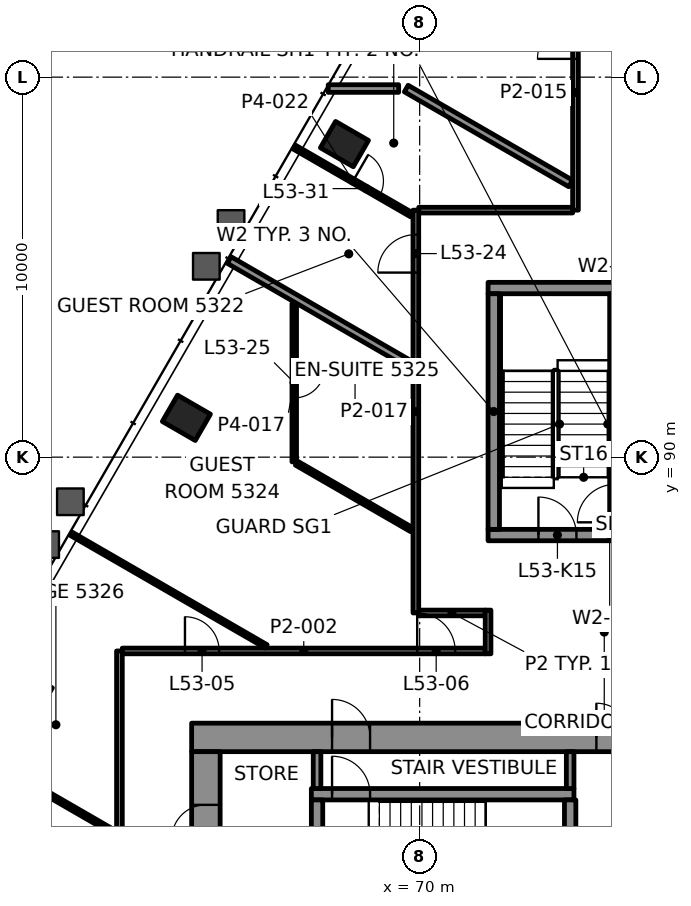
"""IFC4 building model, lengths in metres.
Left out: names, types, materials, properties, quantities, classifications, styles, units other than length and angle.
Written with IfcOpenShell. Run it as: python <this file> out.ifc"""

import sys

from ifc_helpers import new_model, si_unit, direction, frame, frame_2d, origin, origin_2d, place, context, subcontext, project, spatial, rectangle, hollow_rectangle, extrude, element, fill, save


model = new_model("IFC4")
c1 = context("Model", 3, precision=1e-05, world=origin(), true_north=direction((0.0, 1.0)))
c2 = subcontext(c1, "Body", "Model", "MODEL_VIEW")
j1 = project(units=[si_unit("LENGTHUNIT", "METRE"), si_unit("PLANEANGLEUNIT", "RADIAN")], contexts=[c1])
p1 = place(None, origin())
s1 = spatial("IfcSite", under=j1, at=p1, CompositionType="ELEMENT")
p2 = place(p1, origin())
s2 = spatial("IfcBuilding", under=s1, at=p2, CompositionType="ELEMENT")
p3 = place(p2, frame((0.0, 0.0, 226.0)))
s3 = spatial("IfcBuildingStorey", under=s2, at=p3, CompositionType="ELEMENT", Elevation=226.0)
for number, where, z_axis, x_axis in (
    (1, (68.021, 98.238, -0.0), (0.0, 0.0, 1.0), (-0.5, -0.866, 0.0)),
    (2, (63.862, 91.035, -0.0), (0.0, 0.0, 1.0), (-0.5, -0.866, 0.0)),
    (3, (59.703, 83.832, -0.0), (0.0, 0.0, 1.0), (-0.5, -0.866, 0.0)),
):
    element("IfcColumn", number, at=place(p3, frame(where, z_axis=z_axis, x_axis=x_axis)), inside=s3, PredefinedType="COLUMN", context=c2, shape_type="SweptSolid", body=[
        extrude(hollow_rectangle(XDim=0.8, YDim=1.0, WallThickness=0.05, at=origin_2d()), origin(), (0.0, 0.0, 1.0), 3.9),
    ])
p4 = place(p3, frame((64.0, 82.625, 0.0), z_axis=(0.0, 0.0, 1.0), x_axis=(1.0, 0.0, 0.0)))
e4 = element("IfcWall", 4, at=p4, inside=s3, PredefinedType="SHEAR", context=c2, shape_type="SweptSolid", body=[
    extrude(rectangle(XDim=22.0, YDim=0.75, at=frame_2d((11.0, 0.0))), origin(), (0.0, 0.0, 1.0), 3.7),
])
p5 = place(p4, frame((3.695, 0.0, 0.0)))
e5 = element("IfcOpeningElement", 5, at=p5, cuts=e4, PredefinedType="OPENING", context=c2, shape_type="SweptSolid", body=[
    extrude(rectangle(XDim=1.0, YDim=2.1, at=frame_2d((0.5, 1.05))), frame((0.0, 0.385, 0.0), z_axis=(0.0, -1.0, 0.0), x_axis=(1.0, 0.0, 0.0)), (0.0, 0.0, 1.0), 0.77),
])
p6 = place(p4, frame((17.505, 0.0, 0.0)))
e6 = element("IfcOpeningElement", 6, at=p6, cuts=e4, PredefinedType="OPENING", context=c2, shape_type="SweptSolid", body=[
    extrude(rectangle(XDim=1.0, YDim=2.1, at=frame_2d((0.5, 1.05))), frame((0.0, 0.385, 0.0), z_axis=(0.0, -1.0, 0.0), x_axis=(1.0, 0.0, 0.0)), (0.0, 0.0, 1.0), 0.77),
])
p7 = place(p4, frame((10.65, 0.0, 0.0)))
e7 = element("IfcOpeningElement", 7, at=p7, cuts=e4, PredefinedType="OPENING", context=c2, shape_type="SweptSolid", body=[
    extrude(rectangle(XDim=0.9, YDim=2.1, at=frame_2d((0.45, 1.05))), frame((0.0, 0.385, 0.0), z_axis=(0.0, -1.0, 0.0), x_axis=(1.0, 0.0, 0.0)), (0.0, 0.0, 1.0), 0.77),
])
p8 = place(p3, frame((64.375, 67.75, 0.0), z_axis=(0.0, 0.0, 1.0), x_axis=(0.0, 1.0, 0.0)))
e8 = element("IfcWall", 8, at=p8, inside=s3, PredefinedType="SHEAR", context=c2, shape_type="SweptSolid", body=[
    extrude(rectangle(XDim=14.5, YDim=0.75, at=frame_2d((7.25, 0.0))), origin(), (0.0, 0.0, 1.0), 3.7),
])
p9 = place(p8, frame((4.65, 0.0, 0.0)))
e9 = element("IfcOpeningElement", 9, at=p9, cuts=e8, PredefinedType="OPENING", context=c2, shape_type="SweptSolid", body=[
    extrude(rectangle(XDim=1.8, YDim=2.1, at=frame_2d((0.9, 1.05))), frame((0.0, 0.385, 0.0), z_axis=(0.0, -1.0, 0.0), x_axis=(1.0, 0.0, 0.0)), (0.0, 0.0, 1.0), 0.77),
])
p10 = place(p8, frame((8.5, 0.0, 0.0)))
e10 = element("IfcOpeningElement", 10, at=p10, cuts=e8, PredefinedType="OPENING", context=c2, shape_type="SweptSolid", body=[
    extrude(rectangle(XDim=0.9, YDim=2.1, at=frame_2d((0.45, 1.05))), frame((0.0, 0.385, 0.0), z_axis=(0.0, -1.0, 0.0), x_axis=(1.0, 0.0, 0.0)), (0.0, 0.0, 1.0), 0.77),
])
p11 = place(p8, frame((12.2, 0.0, 0.0)))
e11 = element("IfcOpeningElement", 11, at=p11, cuts=e8, PredefinedType="OPENING", context=c2, shape_type="SweptSolid", body=[
    extrude(rectangle(XDim=0.9, YDim=2.1, at=frame_2d((0.45, 1.05))), frame((0.0, 0.385, 0.0), z_axis=(0.0, -1.0, 0.0), x_axis=(1.0, 0.0, 0.0)), (0.0, 0.0, 1.0), 0.77),
])
p12 = place(p3, frame((67.15, 81.13, 0.0), z_axis=(0.0, 0.0, 1.0), x_axis=(1.0, 0.0, 0.0)))
e12 = element("IfcWall", 12, at=p12, inside=s3, PredefinedType="SHEAR", context=c2, shape_type="SweptSolid", body=[
    extrude(rectangle(XDim=6.91, YDim=0.3, at=frame_2d((3.455, 0.0))), origin(), (0.0, 0.0, 1.0), 3.7),
])
p13 = place(p12, frame((0.545, 0.0, 0.0)))
e13 = element("IfcOpeningElement", 13, at=p13, cuts=e12, PredefinedType="OPENING", context=c2, shape_type="SweptSolid", body=[
    extrude(rectangle(XDim=1.0, YDim=2.1, at=frame_2d((0.5, 1.05))), frame((0.0, 0.16, 0.0), z_axis=(0.0, -1.0, 0.0), x_axis=(1.0, 0.0, 0.0)), (0.0, 0.0, 1.0), 0.32),
])
for number, where, z_axis, x_axis in (
    (14, (67.3, 77.9, 0.0), (0.0, 0.0, 1.0), (0.0, 1.0, 0.0)),
    (15, (73.96, 77.9, 0.0), (0.0, 0.0, 1.0), (0.0, 1.0, 0.0)),
):
    element("IfcWall", number, at=place(p3, frame(where, z_axis=z_axis, x_axis=x_axis)), inside=s3, PredefinedType="SHEAR", context=c2, shape_type="SweptSolid", body=[
        extrude(rectangle(XDim=3.08, YDim=0.3, at=frame_2d((1.54, 0.0))), origin(), (0.0, 0.0, 1.0), 3.7),
    ])
p14 = place(p3, frame((71.8, 87.95, 0.0), z_axis=(0.0, 0.0, 1.0), x_axis=(1.0, 0.0, 0.0)))
e16 = element("IfcWall", 16, at=p14, inside=s3, PredefinedType="SHEAR", context=c2, shape_type="SweptSolid", body=[
    extrude(rectangle(XDim=6.4, YDim=0.3, at=frame_2d((3.2, 0.0))), origin(), (0.0, 0.0, 1.0), 3.7),
])
p15 = place(p14, frame((1.325, 0.0, 0.0)))
e17 = element("IfcOpeningElement", 17, at=p15, cuts=e16, PredefinedType="OPENING", context=c2, shape_type="SweptSolid", body=[
    extrude(rectangle(XDim=1.0, YDim=2.1, at=frame_2d((0.5, 1.05))), frame((0.0, 0.16, 0.0), z_axis=(0.0, -1.0, 0.0), x_axis=(1.0, 0.0, 0.0)), (0.0, 0.0, 1.0), 0.32),
])
p16 = place(p14, frame((4.125, 0.0, 0.0)))
e18 = element("IfcOpeningElement", 18, at=p16, cuts=e16, PredefinedType="OPENING", context=c2, shape_type="SweptSolid", body=[
    extrude(rectangle(XDim=1.2, YDim=2.1, at=frame_2d((0.6, 1.05))), frame((0.0, 0.16, 0.0), z_axis=(0.0, -1.0, 0.0), x_axis=(1.0, 0.0, 0.0)), (0.0, 0.0, 1.0), 0.32),
])
p17 = place(p3, frame((71.8, 94.45, 0.0), z_axis=(0.0, 0.0, 1.0), x_axis=(1.0, 0.0, 0.0)))
e19 = element("IfcWall", 19, at=p17, inside=s3, PredefinedType="SHEAR", context=c2, shape_type="SweptSolid", body=[
    extrude(rectangle(XDim=6.4, YDim=0.3, at=frame_2d((3.2, 0.0))), origin(), (0.0, 0.0, 1.0), 3.7),
])
p18 = place(p3, frame((71.95, 88.1, 0.0), z_axis=(0.0, 0.0, 1.0), x_axis=(0.0, 1.0, 0.0)))
e20 = element("IfcWall", 20, at=p18, inside=s3, PredefinedType="SHEAR", context=c2, shape_type="SweptSolid", body=[
    extrude(rectangle(XDim=6.2, YDim=0.3, at=frame_2d((3.1, 0.0))), origin(), (0.0, 0.0, 1.0), 3.7),
])
p19 = place(p3, frame((75.15, 88.1, 0.0), z_axis=(0.0, 0.0, 1.0), x_axis=(0.0, 1.0, 0.0)))
e21 = element("IfcWall", 21, at=p19, inside=s3, PredefinedType="SHEAR", context=c2, shape_type="SweptSolid", body=[
    extrude(rectangle(XDim=6.2, YDim=0.3, at=frame_2d((3.1, 0.0))), origin(), (0.0, 0.0, 1.0), 3.7),
])
p20 = place(p19, frame((0.185, 0.0, 0.0)))
e22 = element("IfcOpeningElement", 22, at=p20, cuts=e21, PredefinedType="OPENING", context=c2, shape_type="SweptSolid", body=[
    extrude(rectangle(XDim=1.0, YDim=2.1, at=frame_2d((0.5, 1.05))), frame((0.0, 0.16, 0.0), z_axis=(0.0, -1.0, 0.0), x_axis=(1.0, 0.0, 0.0)), (0.0, 0.0, 1.0), 0.32),
])
p21 = place(p3, frame((62.176, 84.9, 0.0), z_axis=(0.0, 0.0, 1.0), x_axis=(1.0, 0.0, 0.0)))
e23 = element("IfcWall", 23, at=p21, inside=s3, PredefinedType="PARTITIONING", context=c2, shape_type="SweptSolid", body=[
    extrude(rectangle(XDim=9.55, YDim=0.15, at=frame_2d((4.775, 0.0))), origin(), (0.0, 0.0, 1.0), 3.097),
])
p22 = place(p21, frame((1.649, 0.0, 0.0)))
e24 = element("IfcOpeningElement", 24, at=p22, cuts=e23, PredefinedType="OPENING", context=c2, shape_type="SweptSolid", body=[
    extrude(rectangle(XDim=0.9, YDim=2.1, at=frame_2d((0.45, 1.05))), frame((0.0, 0.085, 0.0), z_axis=(0.0, -1.0, 0.0), x_axis=(1.0, 0.0, 0.0)), (0.0, 0.0, 1.0), 0.17),
])
p23 = place(p21, frame((7.759, 0.0, 0.0)))
e25 = element("IfcOpeningElement", 25, at=p23, cuts=e23, PredefinedType="OPENING", context=c2, shape_type="SweptSolid", body=[
    extrude(rectangle(XDim=1.0, YDim=2.1, at=frame_2d((0.5, 1.05))), frame((0.0, 0.085, 0.0), z_axis=(0.0, -1.0, 0.0), x_axis=(1.0, 0.0, 0.0)), (0.0, 0.0, 1.0), 0.17),
])
p24 = place(p3, frame((69.976, 85.9, 0.0), z_axis=(0.0, 0.0, 1.0), x_axis=(1.0, 0.0, 0.0)))
e26 = element("IfcWall", 26, at=p24, inside=s3, PredefinedType="PARTITIONING", context=c2, shape_type="SweptSolid", body=[
    extrude(rectangle(XDim=1.75, YDim=0.15, at=frame_2d((0.875, 0.0))), origin(), (0.0, 0.0, 1.0), 3.1),
])
p25 = place(p3, frame((69.976, 96.5, 0.0), z_axis=(0.0, 0.0, 1.0), x_axis=(1.0, 0.0, 0.0)))
e27 = element("IfcWall", 27, at=p25, inside=s3, PredefinedType="PARTITIONING", context=c2, shape_type="SweptSolid", body=[
    extrude(rectangle(XDim=4.049, YDim=0.15, at=frame_2d((2.025, 0.0))), origin(), (0.0, 0.0, 1.0), 3.1),
])
p26 = place(p3, frame((67.594, 99.7, 0.0), z_axis=(0.0, 0.0, 1.0), x_axis=(1.0, 0.0, 0.0)))
e28 = element("IfcWall", 28, at=p26, inside=s3, PredefinedType="PARTITIONING", context=c2, shape_type="SweptSolid", body=[
    extrude(rectangle(XDim=1.853, YDim=0.2, at=frame_2d((0.927, 0.0))), origin(), (0.0, 0.0, 1.0), 3.1),
])
p27 = place(p3, frame((74.1, 96.5, 0.0), z_axis=(0.0, 0.0, 1.0), x_axis=(0.0, 1.0, 0.0)))
e29 = element("IfcWall", 29, at=p27, inside=s3, PredefinedType="PARTITIONING", context=c2, shape_type="SweptSolid", body=[
    extrude(rectangle(XDim=6.191, YDim=0.15, at=frame_2d((3.096, 0.0))), origin(), (0.0, 0.0, 1.0), 3.1),
])
p28 = place(p27, frame((3.981, 0.0, 0.0)))
e30 = element("IfcOpeningElement", 30, at=p28, cuts=e29, PredefinedType="OPENING", context=c2, shape_type="SweptSolid", body=[
    extrude(rectangle(XDim=1.0, YDim=2.1, at=frame_2d((0.5, 1.05))), frame((0.0, 0.085, 0.0), z_axis=(0.0, -1.0, 0.0), x_axis=(1.0, 0.0, 0.0)), (0.0, 0.0, 1.0), 0.17),
])
p29 = place(p3, frame((71.8, 84.825, 0.0), z_axis=(0.0, 0.0, 1.0), x_axis=(0.0, 1.0, 0.0)))
e31 = element("IfcWall", 31, at=p29, inside=s3, PredefinedType="PARTITIONING", context=c2, shape_type="SweptSolid", body=[
    extrude(rectangle(XDim=1.15, YDim=0.15, at=frame_2d((0.575, 0.0))), origin(), (0.0, 0.0, 1.0), 3.1),
])
p30 = place(p3, frame((69.9, 85.9, 0.0), z_axis=(0.0, 0.0, 1.0), x_axis=(0.0, 1.0, 0.0)))
e32 = element("IfcWall", 32, at=p30, inside=s3, PredefinedType="PARTITIONING", context=c2, shape_type="SweptSolid", body=[
    extrude(rectangle(XDim=10.599, YDim=0.15, at=frame_2d((5.3, 0.0))), origin(), (0.0, 0.0, 1.0), 3.1),
])
p31 = place(p30, frame((8.956, 0.0, 0.0)))
e33 = element("IfcOpeningElement", 33, at=p31, cuts=e32, PredefinedType="OPENING", context=c2, shape_type="SweptSolid", body=[
    extrude(rectangle(XDim=1.0, YDim=2.1, at=frame_2d((0.5, 1.05))), frame((0.0, 0.085, 0.0), z_axis=(0.0, -1.0, 0.0), x_axis=(1.0, 0.0, 0.0)), (0.0, 0.0, 1.0), 0.17),
])
p32 = place(p3, frame((66.7, 94.043, 0.0), z_axis=(0.0, 0.0, 1.0), x_axis=(0.0, -1.0, 0.0)))
e34 = element("IfcWall", 34, at=p32, inside=s3, PredefinedType="PARTITIONING", context=c2, shape_type="SweptSolid", body=[
    extrude(rectangle(XDim=4.167, YDim=0.12, at=frame_2d((2.083, 0.0))), origin(), (0.0, 0.0, 1.0), 3.1),
])
p33 = place(p32, frame((1.683, 0.0, 0.0)))
e35 = element("IfcOpeningElement", 35, at=p33, cuts=e34, PredefinedType="OPENING", context=c2, shape_type="SweptSolid", body=[
    extrude(rectangle(XDim=0.8, YDim=2.1, at=frame_2d((0.4, 1.05))), frame((0.0, 0.07, 0.0), z_axis=(0.0, -1.0, 0.0), x_axis=(1.0, 0.0, 0.0)), (0.0, 0.0, 1.0), 0.14),
])
p34 = place(p3, frame((62.1, 68.591, 0.0), z_axis=(0.0, 0.0, 1.0), x_axis=(0.0, 1.0, 0.0)))
e36 = element("IfcWall", 36, at=p34, inside=s3, PredefinedType="PARTITIONING", context=c2, shape_type="SweptSolid", body=[
    extrude(rectangle(XDim=16.308, YDim=0.15, at=frame_2d((8.154, 0.0))), origin(), (0.0, 0.0, 1.0), 3.1),
])
p35 = place(p34, frame((0.96, 0.0, 0.0)))
e37 = element("IfcOpeningElement", 37, at=p35, cuts=e36, PredefinedType="OPENING", context=c2, shape_type="SweptSolid", body=[
    extrude(rectangle(XDim=1.0, YDim=2.1, at=frame_2d((0.5, 1.05))), frame((0.0, 0.085, 0.0), z_axis=(0.0, -1.0, 0.0), x_axis=(1.0, 0.0, 0.0)), (0.0, 0.0, 1.0), 0.17),
])
p36 = place(p34, frame((6.772, 0.0, 0.0)))
e38 = element("IfcOpeningElement", 38, at=p36, cuts=e36, PredefinedType="OPENING", context=c2, shape_type="SweptSolid", body=[
    extrude(rectangle(XDim=1.0, YDim=2.1, at=frame_2d((0.5, 1.05))), frame((0.0, 0.085, 0.0), z_axis=(0.0, -1.0, 0.0), x_axis=(1.0, 0.0, 0.0)), (0.0, 0.0, 1.0), 0.17),
])
p37 = place(p3, frame((73.973, 97.202, 0.0), z_axis=(0.0, 0.0, 1.0), x_axis=(-0.866035818332, 0.499981961041, 0.0)))
e39 = element("IfcWall", 39, at=p37, inside=s3, PredefinedType="PARTITIONING", context=c2, shape_type="SweptSolid", body=[
    extrude(rectangle(XDim=4.995, YDim=0.2, at=frame_2d((2.498, 0.0))), origin(), (0.0, 0.0, 1.0), 3.1),
])
p38 = place(p3, frame((66.704, 98.158, 0.0), z_axis=(0.0, 0.0, 1.0), x_axis=(0.866021313335, -0.500007084799, 0.0)))
e40 = element("IfcWall", 40, at=p38, inside=s3, PredefinedType="PARTITIONING", context=c2, shape_type="SweptSolid", body=[
    extrude(rectangle(XDim=3.564, YDim=0.12, at=frame_2d((1.782, 0.0))), origin(), (0.0, 0.0, 1.0), 3.022),
])
p39 = place(p38, frame((1.782, 0.0, 0.0)))
e41 = element("IfcOpeningElement", 41, at=p39, cuts=e40, PredefinedType="OPENING", context=c2, shape_type="SweptSolid", body=[
    extrude(rectangle(XDim=0.8, YDim=2.1, at=frame_2d((0.4, 1.05))), frame((0.0, 0.07, 0.0), z_axis=(0.0, -1.0, 0.0), x_axis=(1.0, 0.0, 0.0)), (0.0, 0.0, 1.0), 0.14),
])
p40 = place(p3, frame((69.773, 92.424, 0.0), z_axis=(0.0, 0.0, 1.0), x_axis=(-0.866031780221, 0.499988955525, 0.0)))
e42 = element("IfcWall", 42, at=p40, inside=s3, PredefinedType="PARTITIONING", context=c2, shape_type="SweptSolid", body=[
    extrude(rectangle(XDim=5.524, YDim=0.2, at=frame_2d((2.762, 0.0))), origin(), (0.0, 0.0, 1.0), 3.022),
])
p41 = place(p3, frame((69.79, 88.092, 0.0), z_axis=(0.0, 0.0, 1.0), x_axis=(-0.866045006744, 0.49996604514, 0.0)))
e43 = element("IfcWall", 43, at=p41, inside=s3, PredefinedType="PARTITIONING", context=c2, shape_type="SweptSolid", body=[
    extrude(rectangle(XDim=3.499, YDim=0.12, at=frame_2d((1.75, 0.0))), origin(), (0.0, 0.0, 1.0), 3.1),
])
p42 = place(p3, frame((65.963, 85.02, 0.0), z_axis=(0.0, 0.0, 1.0), x_axis=(-0.866029186229, 0.499993448556, 0.0)))
e44 = element("IfcWall", 44, at=p42, inside=s3, PredefinedType="PARTITIONING", context=c2, shape_type="SweptSolid", body=[
    extrude(rectangle(XDim=5.927, YDim=0.1, at=frame_2d((2.963, 0.0))), origin(), (0.0, 0.0, 1.0), 3.022),
])
p43 = place(p3, frame((61.991, 80.11, 0.0), z_axis=(0.0, 0.0, 1.0), x_axis=(-0.866024338871, 0.500001844479, 0.0)))
e45 = element("IfcWall", 45, at=p43, inside=s3, PredefinedType="PARTITIONING", context=c2, shape_type="SweptSolid", body=[
    extrude(rectangle(XDim=4.942, YDim=0.12, at=frame_2d((2.471, 0.0))), origin(), (0.0, 0.0, 1.0), 3.022),
])
for number, where, z_axis, x_axis in (
    (46, (67.3, 81.28, 0.0), (0.0, 0.0, 1.0), (0.0, 1.0, 0.0)),
    (47, (73.96, 81.28, 0.0), (0.0, 0.0, 1.0), (0.0, 1.0, 0.0)),
):
    element("IfcWall", number, at=place(p3, frame(where, z_axis=z_axis, x_axis=x_axis)), inside=s3, PredefinedType="PARTITIONING", context=c2, shape_type="SweptSolid", body=[
        extrude(rectangle(XDim=0.97, YDim=0.2, at=frame_2d((0.485, 0.0))), origin(), (0.0, 0.0, 1.0), 3.7),
    ])
p44 = place(p22, origin())
e48 = element("IfcDoor", 48, at=p44, inside=s3, OperationType="SINGLE_SWING_LEFT", PredefinedType="DOOR", context=c2, shape_type="SweptSolid", body=[
    extrude(rectangle(XDim=0.9, YDim=2.1, at=frame_2d((0.45, 1.05))), frame((0.0, 0.025, 0.0), z_axis=(0.0, -1.0, 0.0), x_axis=(1.0, 0.0, 0.0)), (0.0, 0.0, 1.0), 0.05),
])
fill(e24, e48)
p45 = place(p23, origin())
e49 = element("IfcDoor", 49, at=p45, inside=s3, OperationType="SINGLE_SWING_LEFT", PredefinedType="DOOR", context=c2, shape_type="SweptSolid", body=[
    extrude(rectangle(XDim=1.0, YDim=2.1, at=frame_2d((0.5, 1.05))), frame((0.0, 0.025, 0.0), z_axis=(0.0, -1.0, 0.0), x_axis=(1.0, 0.0, 0.0)), (0.0, 0.0, 1.0), 0.05),
])
fill(e25, e49)
p46 = place(p28, origin())
e50 = element("IfcDoor", 50, at=p46, inside=s3, OperationType="SINGLE_SWING_LEFT", PredefinedType="DOOR", context=c2, shape_type="SweptSolid", body=[
    extrude(rectangle(XDim=1.0, YDim=2.1, at=frame_2d((0.5, 1.05))), frame((0.0, 0.025, 0.0), z_axis=(0.0, -1.0, 0.0), x_axis=(1.0, 0.0, 0.0)), (0.0, 0.0, 1.0), 0.05),
])
fill(e30, e50)
p47 = place(p31, origin())
e51 = element("IfcDoor", 51, at=p47, inside=s3, OperationType="SINGLE_SWING_LEFT", PredefinedType="DOOR", context=c2, shape_type="SweptSolid", body=[
    extrude(rectangle(XDim=1.0, YDim=2.1, at=frame_2d((0.5, 1.05))), frame((0.0, 0.025, 0.0), z_axis=(0.0, -1.0, 0.0), x_axis=(1.0, 0.0, 0.0)), (0.0, 0.0, 1.0), 0.05),
])
fill(e33, e51)
p48 = place(p33, origin())
e52 = element("IfcDoor", 52, at=p48, inside=s3, OperationType="SINGLE_SWING_LEFT", PredefinedType="DOOR", context=c2, shape_type="SweptSolid", body=[
    extrude(rectangle(XDim=0.8, YDim=2.1, at=frame_2d((0.4, 1.05))), frame((0.0, 0.025, 0.0), z_axis=(0.0, -1.0, 0.0), x_axis=(1.0, 0.0, 0.0)), (0.0, 0.0, 1.0), 0.05),
])
fill(e35, e52)
p49 = place(p39, origin())
e53 = element("IfcDoor", 53, at=p49, inside=s3, OperationType="SINGLE_SWING_LEFT", PredefinedType="DOOR", context=c2, shape_type="SweptSolid", body=[
    extrude(rectangle(XDim=0.8, YDim=2.1, at=frame_2d((0.4, 1.05))), frame((0.0, 0.025, 0.0), z_axis=(0.0, -1.0, 0.0), x_axis=(1.0, 0.0, 0.0)), (0.0, 0.0, 1.0), 0.05),
])
fill(e41, e53)
p50 = place(p13, origin())
e54 = element("IfcDoor", 54, at=p50, inside=s3, OperationType="SINGLE_SWING_RIGHT", PredefinedType="DOOR", context=c2, shape_type="SweptSolid", body=[
    extrude(rectangle(XDim=1.0, YDim=2.1, at=frame_2d((0.5, 1.05))), frame((0.0, 0.025, 0.0), z_axis=(0.0, -1.0, 0.0), x_axis=(1.0, 0.0, 0.0)), (0.0, 0.0, 1.0), 0.05),
])
fill(e13, e54)
p51 = place(p5, origin())
e55 = element("IfcDoor", 55, at=p51, inside=s3, OperationType="SINGLE_SWING_LEFT", PredefinedType="DOOR", context=c2, shape_type="SweptSolid", body=[
    extrude(rectangle(XDim=1.0, YDim=2.1, at=frame_2d((0.5, 1.05))), frame((0.0, 0.095, 0.0), z_axis=(0.0, -1.0, 0.0), x_axis=(1.0, 0.0, 0.0)), (0.0, 0.0, 1.0), 0.19),
])
fill(e5, e55)
p52 = place(p15, origin())
e56 = element("IfcDoor", 56, at=p52, inside=s3, OperationType="SINGLE_SWING_RIGHT", PredefinedType="DOOR", context=c2, shape_type="SweptSolid", body=[
    extrude(rectangle(XDim=1.0, YDim=2.1, at=frame_2d((0.5, 1.05))), frame((0.0, 0.025, 0.0), z_axis=(0.0, -1.0, 0.0), x_axis=(1.0, 0.0, 0.0)), (0.0, 0.0, 1.0), 0.05),
])
fill(e17, e56)
p53 = place(p11, origin())
e57 = element("IfcDoor", 57, at=p53, inside=s3, OperationType="SINGLE_SWING_LEFT", PredefinedType="DOOR", context=c2, shape_type="SweptSolid", body=[
    extrude(rectangle(XDim=0.9, YDim=2.1, at=frame_2d((0.45, 1.05))), frame((0.0, 0.095, 0.0), z_axis=(0.0, -1.0, 0.0), x_axis=(1.0, 0.0, 0.0)), (0.0, 0.0, 1.0), 0.19),
])
fill(e11, e57)
p54 = place(p7, origin())
e58 = element("IfcDoor", 58, at=p54, inside=s3, OperationType="SINGLE_SWING_RIGHT", PredefinedType="DOOR", context=c2, shape_type="SweptSolid", body=[
    extrude(rectangle(XDim=0.9, YDim=2.1, at=frame_2d((0.45, 1.05))), frame((0.0, 0.095, 0.0), z_axis=(0.0, -1.0, 0.0), x_axis=(1.0, 0.0, 0.0)), (0.0, 0.0, 1.0), 0.19),
])
fill(e7, e58)
save(model, sys.argv[1])
